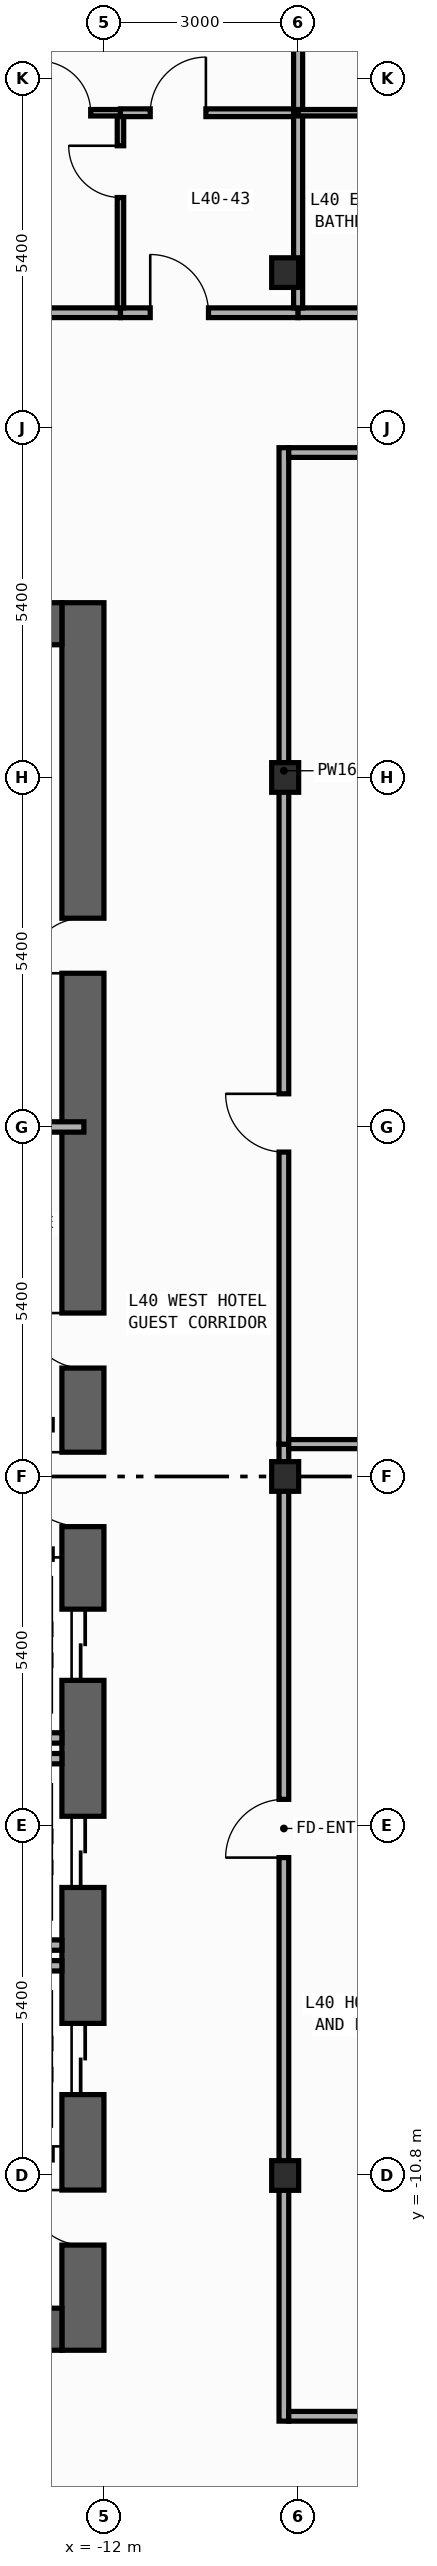
"""IFC4 building model, lengths in metres.
Left out: names, types, materials, properties, quantities, classifications, styles, units other than length and angle.
Written with IfcOpenShell. Run it as: python <this file> out.ifc"""

import sys

from ifc_helpers import new_model, si_unit, direction, frame, frame_2d, origin, origin_2d, place, context, subcontext, project, spatial, rectangle, i_section, extrude, element, fill, save


model = new_model("IFC4")
c1 = context("Model", 3, precision=1e-05, world=origin(), true_north=direction((0.0, 1.0)))
c2 = subcontext(c1, "Body", "Model", "MODEL_VIEW")
j1 = project(units=[si_unit("LENGTHUNIT", "METRE"), si_unit("PLANEANGLEUNIT", "RADIAN")], contexts=[c1])
p1 = place(None, origin())
s1 = spatial("IfcSite", under=j1, at=p1, CompositionType="ELEMENT")
p2 = place(p1, origin())
s2 = spatial("IfcBuilding", under=s1, at=p2, CompositionType="ELEMENT")
p3 = place(p2, frame((0.0, 0.0, 176.4)))
s3 = spatial("IfcBuildingStorey", under=s2, at=p3, CompositionType="ELEMENT", Elevation=176.4)
p4 = place(p3, frame((-12.325, -13.5, 0.0), z_axis=(0.0, 0.0, 1.0), x_axis=(0.0, 1.0, 0.0)))
e1 = element("IfcWall", 1, at=p4, inside=s3, PredefinedType="SHEAR", context=c2, shape_type="SweptSolid", body=[
    extrude(rectangle(XDim=27.0, YDim=0.65, at=frame_2d((13.5, 0.0))), origin(), (0.0, 0.0, 1.0), 3.54),
])
p5 = place(p4, frame((10.35, 0.0, 0.0)))
e2 = element("IfcOpeningElement", 2, at=p5, cuts=e1, PredefinedType="OPENING", context=c2, shape_type="SweptSolid", body=[
    extrude(rectangle(XDim=1.1, YDim=2.2, at=frame_2d((0.55, 1.1))), frame((0.0, 0.335, 0.0), z_axis=(0.0, -1.0, 0.0), x_axis=(1.0, 0.0, 0.0)), (0.0, 0.0, 1.0), 0.67),
])
p6 = place(p4, frame((7.15, 0.0, 0.0)))
e3 = element("IfcOpeningElement", 3, at=p6, cuts=e1, PredefinedType="OPENING", context=c2, shape_type="SweptSolid", body=[
    extrude(rectangle(XDim=1.1, YDim=2.2, at=frame_2d((0.55, 1.1))), frame((0.0, 0.335, 0.0), z_axis=(0.0, -1.0, 0.0), x_axis=(1.0, 0.0, 0.0)), (0.0, 0.0, 1.0), 0.67),
])
p7 = place(p4, frame((3.95, 0.0, 0.0)))
e4 = element("IfcOpeningElement", 4, at=p7, cuts=e1, PredefinedType="OPENING", context=c2, shape_type="SweptSolid", body=[
    extrude(rectangle(XDim=1.1, YDim=2.2, at=frame_2d((0.55, 1.1))), frame((0.0, 0.335, 0.0), z_axis=(0.0, -1.0, 0.0), x_axis=(1.0, 0.0, 0.0)), (0.0, 0.0, 1.0), 0.67),
])
p8 = place(p4, frame((15.175, 0.0, 0.0)))
e5 = element("IfcOpeningElement", 5, at=p8, cuts=e1, PredefinedType="OPENING", context=c2, shape_type="SweptSolid", body=[
    extrude(rectangle(XDim=0.85, YDim=2.1, at=frame_2d((0.425, 1.05))), frame((0.0, 0.335, 0.0), z_axis=(0.0, -1.0, 0.0), x_axis=(1.0, 0.0, 0.0)), (0.0, 0.0, 1.0), 0.67),
])
p9 = place(p4, frame((21.275, 0.0, 0.0)))
e6 = element("IfcOpeningElement", 6, at=p9, cuts=e1, PredefinedType="OPENING", context=c2, shape_type="SweptSolid", body=[
    extrude(rectangle(XDim=0.85, YDim=2.1, at=frame_2d((0.425, 1.05))), frame((0.0, 0.335, 0.0), z_axis=(0.0, -1.0, 0.0), x_axis=(1.0, 0.0, 0.0)), (0.0, 0.0, 1.0), 0.67),
])
p10 = place(p4, frame((12.725, 0.0, 0.0)))
e7 = element("IfcOpeningElement", 7, at=p10, cuts=e1, PredefinedType="OPENING", context=c2, shape_type="SweptSolid", body=[
    extrude(rectangle(XDim=1.15, YDim=2.2, at=frame_2d((0.575, 1.1))), frame((0.0, 0.335, 0.0), z_axis=(0.0, -1.0, 0.0), x_axis=(1.0, 0.0, 0.0)), (0.0, 0.0, 1.0), 0.67),
])
p11 = place(p4, frame((1.625, 0.0, 0.0)))
e8 = element("IfcOpeningElement", 8, at=p11, cuts=e1, PredefinedType="OPENING", context=c2, shape_type="SweptSolid", body=[
    extrude(rectangle(XDim=0.85, YDim=2.1, at=frame_2d((0.425, 1.05))), frame((0.0, 0.335, 0.0), z_axis=(0.0, -1.0, 0.0), x_axis=(1.0, 0.0, 0.0)), (0.0, 0.0, 1.0), 0.67),
])
for number, where, z_axis, x_axis in (
    (9, (-19.75, -13.175, 0.0), (0.0, 0.0, 1.0), (1.0, 0.0, 0.0)),
    (10, (-19.75, 13.175, 0.0), (0.0, 0.0, 1.0), (1.0, 0.0, 0.0)),
):
    element("IfcWall", number, at=place(p3, frame(where, z_axis=z_axis, x_axis=x_axis)), inside=s3, PredefinedType="SHEAR", context=c2, shape_type="SweptSolid", body=[
        extrude(rectangle(XDim=7.1, YDim=0.65, at=frame_2d((3.55, 0.0))), origin(), (0.0, 0.0, 1.0), 3.54),
    ])
for number, where, z_axis, x_axis in (
    (11, (-9.2, -10.8, 0.0), (0.0, 0.0, 1.0), (1.0, 0.0, 0.0)),
    (12, (-9.2, 0.0, 0.0), (0.0, 0.0, 1.0), (1.0, 0.0, 0.0)),
    (13, (-9.2, 10.8, 0.0), (0.0, 0.0, 1.0), (1.0, 0.0, 0.0)),
    (14, (-9.2, 18.6, 0.0), (0.0, 0.0, 1.0), (1.0, 0.0, 0.0)),
):
    element("IfcColumn", number, at=place(p3, frame(where, z_axis=z_axis, x_axis=x_axis)), inside=s3, PredefinedType="COLUMN", context=c2, shape_type="SweptSolid", body=[
        extrude(i_section(OverallWidth=0.417, OverallDepth=0.458, WebThickness=0.03, FlangeThickness=0.05, FilletRadius=0.022, at=origin_2d()), origin(), (0.0, 0.0, 1.0), 3.8),
    ])
for number, where, z_axis, x_axis in (
    (15, (-14.99, -4.04, 0.0), (0.0, 0.0, 1.0), (1.0, 0.0, 0.0)),
    (16, (-14.99, -7.24, 0.0), (0.0, 0.0, 1.0), (1.0, 0.0, 0.0)),
    (17, (-14.99, -4.36, 0.0), (0.0, 0.0, 1.0), (1.0, 0.0, 0.0)),
    (18, (-14.99, -7.56, 0.0), (0.0, 0.0, 1.0), (1.0, 0.0, 0.0)),
):
    element("IfcWall", number, at=place(p3, frame(where, z_axis=z_axis, x_axis=x_axis)), inside=s3, PredefinedType="STANDARD", context=c2, shape_type="SweptSolid", body=[
        extrude(rectangle(XDim=2.34, YDim=0.16, at=frame_2d((1.17, 0.0))), origin(), (0.0, 0.0, 1.0), 3.54),
    ])
p12 = place(p3, frame((-15.375, 5.4, 0.0), z_axis=(0.0, 0.0, 1.0), x_axis=(1.0, 0.0, 0.0)))
e19 = element("IfcWall", 19, at=p12, inside=s3, PredefinedType="PARTITIONING", context=c2, shape_type="SweptSolid", body=[
    extrude(rectangle(XDim=3.065, YDim=0.16, at=frame_2d((1.532, 0.0))), origin(), (0.0, 0.0, 1.0), 3.54),
])
p13 = place(p3, frame((-9.22, -14.595, 0.0), z_axis=(0.0, 0.0, 1.0), x_axis=(0.0, 1.0, 0.0)))
e20 = element("IfcWall", 20, at=p13, inside=s3, PredefinedType="PARTITIONING", context=c2, shape_type="SweptSolid", body=[
    extrude(rectangle(XDim=15.095, YDim=0.15, at=frame_2d((7.547, 0.0))), origin(), (0.0, 0.0, 1.0), 2.952),
])
p14 = place(p13, frame((8.707, 0.0, 0.0)))
e21 = element("IfcOpeningElement", 21, at=p14, cuts=e20, PredefinedType="OPENING", context=c2, shape_type="SweptSolid", body=[
    extrude(rectangle(XDim=0.9, YDim=2.15, at=frame_2d((0.45, 1.075))), frame((0.0, 0.085, 0.0), z_axis=(0.0, -1.0, 0.0), x_axis=(1.0, 0.0, 0.0)), (0.0, 0.0, 1.0), 0.17),
])
p15 = place(p3, frame((-9.22, 0.5, 0.0), z_axis=(0.0, 0.0, 1.0), x_axis=(0.0, 1.0, 0.0)))
e22 = element("IfcWall", 22, at=p15, inside=s3, PredefinedType="PARTITIONING", context=c2, shape_type="SweptSolid", body=[
    extrude(rectangle(XDim=15.395, YDim=0.15, at=frame_2d((7.698, 0.0))), origin(), (0.0, 0.0, 1.0), 2.952),
])
p16 = place(p15, frame((4.512, 0.0, 0.0)))
e23 = element("IfcOpeningElement", 23, at=p16, cuts=e22, PredefinedType="OPENING", context=c2, shape_type="SweptSolid", body=[
    extrude(rectangle(XDim=0.9, YDim=2.15, at=frame_2d((0.45, 1.075))), frame((0.0, 0.085, 0.0), z_axis=(0.0, -1.0, 0.0), x_axis=(1.0, 0.0, 0.0)), (0.0, 0.0, 1.0), 0.17),
])
p17 = place(p3, frame((-9.145, 15.82, 0.0), z_axis=(0.0, 0.0, 1.0), x_axis=(1.0, 0.0, 0.0)))
e24 = element("IfcWall", 24, at=p17, inside=s3, PredefinedType="PARTITIONING", context=c2, shape_type="SweptSolid", body=[
    extrude(rectangle(XDim=8.825, YDim=0.15, at=frame_2d((4.413, 0.0))), origin(), (0.0, 0.0, 1.0), 3.54),
])
p18 = place(p17, frame((1.661, 0.0, 0.0)))
e25 = element("IfcOpeningElement", 25, at=p18, cuts=e24, PredefinedType="OPENING", context=c2, shape_type="SweptSolid", body=[
    extrude(rectangle(XDim=0.9, YDim=2.15, at=frame_2d((0.45, 1.075))), frame((0.0, 0.085, 0.0), z_axis=(0.0, -1.0, 0.0), x_axis=(1.0, 0.0, 0.0)), (0.0, 0.0, 1.0), 0.17),
])
p19 = place(p3, frame((-14.4, 17.98, 0.0), z_axis=(0.0, 0.0, 1.0), x_axis=(1.0, 0.0, 0.0)))
e26 = element("IfcWall", 26, at=p19, inside=s3, PredefinedType="PARTITIONING", context=c2, shape_type="SweptSolid", body=[
    extrude(rectangle(XDim=2.655, YDim=0.15, at=frame_2d((1.327, 0.0))), origin(), (0.0, 0.0, 1.0), 3.54),
])
p20 = place(p3, frame((-11.745, 17.98, 0.0), z_axis=(0.0, 0.0, 1.0), x_axis=(1.0, 0.0, 0.0)))
e27 = element("IfcWall", 27, at=p20, inside=s3, PredefinedType="PARTITIONING", context=c2, shape_type="SweptSolid", body=[
    extrude(rectangle(XDim=2.745, YDim=0.15, at=frame_2d((1.373, 0.0))), origin(), (0.0, 0.0, 1.0), 3.54),
])
p21 = place(p20, frame((0.46, 0.0, 0.0)))
e28 = element("IfcOpeningElement", 28, at=p21, cuts=e27, PredefinedType="OPENING", context=c2, shape_type="SweptSolid", body=[
    extrude(rectangle(XDim=0.9, YDim=2.15, at=frame_2d((0.45, 1.075))), frame((0.0, 0.085, 0.0), z_axis=(0.0, -1.0, 0.0), x_axis=(1.0, 0.0, 0.0)), (0.0, 0.0, 1.0), 0.17),
])
p22 = place(p3, frame((-9.0, 17.98, 0.0), z_axis=(0.0, 0.0, 1.0), x_axis=(1.0, 0.0, 0.0)))
e29 = element("IfcWall", 29, at=p22, inside=s3, PredefinedType="PARTITIONING", context=c2, shape_type="SweptSolid", body=[
    extrude(rectangle(XDim=3.54, YDim=0.15, at=frame_2d((1.77, 0.0))), origin(), (0.0, 0.0, 1.0), 3.54),
])
p23 = place(p3, frame((-9.145, -14.52, 0.0), z_axis=(0.0, 0.0, 1.0), x_axis=(1.0, 0.0, 0.0)))
e30 = element("IfcWall", 30, at=p23, inside=s3, PredefinedType="PARTITIONING", context=c2, shape_type="SweptSolid", body=[
    extrude(rectangle(XDim=3.025, YDim=0.15, at=frame_2d((1.512, 0.0))), origin(), (0.0, 0.0, 1.0), 3.54),
])
p24 = place(p23, frame((1.665, 0.0, 0.0)))
e31 = element("IfcOpeningElement", 31, at=p24, cuts=e30, PredefinedType="OPENING", context=c2, shape_type="SweptSolid", body=[
    extrude(rectangle(XDim=0.9, YDim=2.15, at=frame_2d((0.45, 1.075))), frame((0.0, 0.085, 0.0), z_axis=(0.0, -1.0, 0.0), x_axis=(1.0, 0.0, 0.0)), (0.0, 0.0, 1.0), 0.17),
])
p25 = place(p3, frame((-9.145, 0.5, 0.0), z_axis=(0.0, 0.0, 1.0), x_axis=(1.0, 0.0, 0.0)))
e32 = element("IfcWall", 32, at=p25, inside=s3, PredefinedType="PARTITIONING", context=c2, shape_type="SweptSolid", body=[
    extrude(rectangle(XDim=3.025, YDim=0.14, at=frame_2d((1.512, 0.0))), origin(), (0.0, 0.0, 1.0), 3.54),
])
p26 = place(p3, frame((-11.745, 18.055, 0.0), z_axis=(0.0, 0.0, 1.0), x_axis=(0.0, 1.0, 0.0)))
e33 = element("IfcWall", 33, at=p26, inside=s3, PredefinedType="PARTITIONING", context=c2, shape_type="SweptSolid", body=[
    extrude(rectangle(XDim=2.965, YDim=0.1, at=frame_2d((1.482, 0.0))), origin(), (0.0, 0.0, 1.0), 3.54),
])
p27 = place(p26, frame((1.705, 0.0, 0.0)))
e34 = element("IfcOpeningElement", 34, at=p27, cuts=e33, PredefinedType="OPENING", context=c2, shape_type="SweptSolid", body=[
    extrude(rectangle(XDim=0.8, YDim=2.1, at=frame_2d((0.4, 1.05))), frame((0.0, 0.06, 0.0), z_axis=(0.0, -1.0, 0.0), x_axis=(1.0, 0.0, 0.0)), (0.0, 0.0, 1.0), 0.12),
])
p28 = place(p3, frame((-14.4, 21.07, 0.0), z_axis=(0.0, 0.0, 1.0), x_axis=(1.0, 0.0, 0.0)))
e35 = element("IfcWall", 35, at=p28, inside=s3, PredefinedType="PARTITIONING", context=c2, shape_type="SweptSolid", body=[
    extrude(rectangle(XDim=2.655, YDim=0.1, at=frame_2d((1.327, 0.0))), origin(), (0.0, 0.0, 1.0), 3.54),
])
p29 = place(p28, frame((1.395, 0.0, 0.0)))
e36 = element("IfcOpeningElement", 36, at=p29, cuts=e35, PredefinedType="OPENING", context=c2, shape_type="SweptSolid", body=[
    extrude(rectangle(XDim=0.8, YDim=2.1, at=frame_2d((0.4, 1.05))), frame((0.0, 0.06, 0.0), z_axis=(0.0, -1.0, 0.0), x_axis=(1.0, 0.0, 0.0)), (0.0, 0.0, 1.0), 0.12),
])
p30 = place(p3, frame((-11.745, 21.07, 0.0), z_axis=(0.0, 0.0, 1.0), x_axis=(1.0, 0.0, 0.0)))
e37 = element("IfcWall", 37, at=p30, inside=s3, PredefinedType="PARTITIONING", context=c2, shape_type="SweptSolid", body=[
    extrude(rectangle(XDim=2.745, YDim=0.12, at=frame_2d((1.373, 0.0))), origin(), (0.0, 0.0, 1.0), 3.54),
])
p31 = place(p30, frame((0.46, 0.0, 0.0)))
e38 = element("IfcOpeningElement", 38, at=p31, cuts=e37, PredefinedType="OPENING", context=c2, shape_type="SweptSolid", body=[
    extrude(rectangle(XDim=0.86, YDim=2.15, at=frame_2d((0.43, 1.075))), frame((0.0, 0.07, 0.0), z_axis=(0.0, -1.0, 0.0), x_axis=(1.0, 0.0, 0.0)), (0.0, 0.0, 1.0), 0.14),
])
p32 = place(p3, frame((-9.0, 18.055, 0.0), z_axis=(0.0, 0.0, 1.0), x_axis=(0.0, 1.0, 0.0)))
e39 = element("IfcWall", 39, at=p32, inside=s3, PredefinedType="PARTITIONING", context=c2, shape_type="SweptSolid", body=[
    extrude(rectangle(XDim=3.015, YDim=0.14, at=frame_2d((1.508, 0.0))), origin(), (0.0, 0.0, 1.0), 2.952),
])
p33 = place(p3, frame((-9.0, 21.07, 0.0), z_axis=(0.0, 0.0, 1.0), x_axis=(0.0, 1.0, 0.0)))
e40 = element("IfcWall", 40, at=p33, inside=s3, PredefinedType="PARTITIONING", context=c2, shape_type="SweptSolid", body=[
    extrude(rectangle(XDim=4.285, YDim=0.14, at=frame_2d((2.143, 0.0))), origin(), (0.0, 0.0, 1.0), 3.54),
])
p34 = place(p3, frame((-9.0, 21.07, 0.0), z_axis=(0.0, 0.0, 1.0), x_axis=(1.0, 0.0, 0.0)))
e41 = element("IfcWall", 41, at=p34, inside=s3, PredefinedType="PARTITIONING", context=c2, shape_type="SweptSolid", body=[
    extrude(rectangle(XDim=3.54, YDim=0.1, at=frame_2d((1.77, 0.0))), origin(), (0.0, 0.0, 1.0), 3.54),
])
p35 = place(p34, frame((1.471, 0.0, 0.0)))
e42 = element("IfcOpeningElement", 42, at=p35, cuts=e41, PredefinedType="OPENING", context=c2, shape_type="SweptSolid", body=[
    extrude(rectangle(XDim=0.8, YDim=2.1, at=frame_2d((0.4, 1.05))), frame((0.0, 0.06, 0.0), z_axis=(0.0, -1.0, 0.0), x_axis=(1.0, 0.0, 0.0)), (0.0, 0.0, 1.0), 0.12),
])
p36 = place(p5, origin())
e43 = element("IfcDoor", 43, at=p36, inside=s3, OperationType="DOUBLE_DOOR_SLIDING", PredefinedType="DOOR", context=c2, shape_type="SweptSolid", body=[
    extrude(rectangle(XDim=1.1, YDim=2.2, at=frame_2d((0.55, 1.1))), frame((0.0, 0.025, 0.0), z_axis=(0.0, -1.0, 0.0), x_axis=(1.0, 0.0, 0.0)), (0.0, 0.0, 1.0), 0.05),
])
fill(e2, e43)
p37 = place(p6, origin())
e44 = element("IfcDoor", 44, at=p37, inside=s3, OperationType="DOUBLE_DOOR_SLIDING", PredefinedType="DOOR", context=c2, shape_type="SweptSolid", body=[
    extrude(rectangle(XDim=1.1, YDim=2.2, at=frame_2d((0.55, 1.1))), frame((0.0, 0.025, 0.0), z_axis=(0.0, -1.0, 0.0), x_axis=(1.0, 0.0, 0.0)), (0.0, 0.0, 1.0), 0.05),
])
fill(e3, e44)
p38 = place(p7, origin())
e45 = element("IfcDoor", 45, at=p38, inside=s3, OperationType="DOUBLE_DOOR_SLIDING", PredefinedType="DOOR", context=c2, shape_type="SweptSolid", body=[
    extrude(rectangle(XDim=1.1, YDim=2.2, at=frame_2d((0.55, 1.1))), frame((0.0, 0.025, 0.0), z_axis=(0.0, -1.0, 0.0), x_axis=(1.0, 0.0, 0.0)), (0.0, 0.0, 1.0), 0.05),
])
fill(e4, e45)
p39 = place(p8, origin())
e46 = element("IfcDoor", 46, at=p39, inside=s3, OperationType="SINGLE_SWING_RIGHT", PredefinedType="DOOR", context=c2, shape_type="SweptSolid", body=[
    extrude(rectangle(XDim=0.85, YDim=2.1, at=frame_2d((0.425, 1.05))), frame((0.0, 0.025, 0.0), z_axis=(0.0, -1.0, 0.0), x_axis=(1.0, 0.0, 0.0)), (0.0, 0.0, 1.0), 0.05),
])
fill(e5, e46)
p40 = place(p9, origin())
e47 = element("IfcDoor", 47, at=p40, inside=s3, OperationType="SINGLE_SWING_LEFT", PredefinedType="DOOR", context=c2, shape_type="SweptSolid", body=[
    extrude(rectangle(XDim=0.85, YDim=2.1, at=frame_2d((0.425, 1.05))), frame((0.0, 0.025, 0.0), z_axis=(0.0, -1.0, 0.0), x_axis=(1.0, 0.0, 0.0)), (0.0, 0.0, 1.0), 0.05),
])
fill(e6, e47)
p41 = place(p10, origin())
e48 = element("IfcDoor", 48, at=p41, inside=s3, OperationType="SINGLE_SWING_RIGHT", PredefinedType="DOOR", context=c2, shape_type="SweptSolid", body=[
    extrude(rectangle(XDim=1.15, YDim=2.2, at=frame_2d((0.575, 1.1))), frame((0.0, 0.025, 0.0), z_axis=(0.0, -1.0, 0.0), x_axis=(1.0, 0.0, 0.0)), (0.0, 0.0, 1.0), 0.05),
])
fill(e7, e48)
p42 = place(p11, origin())
e49 = element("IfcDoor", 49, at=p42, inside=s3, OperationType="SINGLE_SWING_RIGHT", PredefinedType="DOOR", context=c2, shape_type="SweptSolid", body=[
    extrude(rectangle(XDim=0.85, YDim=2.1, at=frame_2d((0.425, 1.05))), frame((0.0, 0.025, 0.0), z_axis=(0.0, -1.0, 0.0), x_axis=(1.0, 0.0, 0.0)), (0.0, 0.0, 1.0), 0.05),
])
fill(e8, e49)
p43 = place(p14, origin())
e50 = element("IfcDoor", 50, at=p43, inside=s3, OperationType="SINGLE_SWING_LEFT", PredefinedType="DOOR", context=c2, shape_type="SweptSolid", body=[
    extrude(rectangle(XDim=0.9, YDim=2.15, at=frame_2d((0.45, 1.075))), frame((0.0, 0.025, 0.0), z_axis=(0.0, -1.0, 0.0), x_axis=(1.0, 0.0, 0.0)), (0.0, 0.0, 1.0), 0.05),
])
fill(e21, e50)
p44 = place(p16, origin())
e51 = element("IfcDoor", 51, at=p44, inside=s3, OperationType="SINGLE_SWING_RIGHT", PredefinedType="DOOR", context=c2, shape_type="SweptSolid", body=[
    extrude(rectangle(XDim=0.9, YDim=2.15, at=frame_2d((0.45, 1.075))), frame((0.0, 0.025, 0.0), z_axis=(0.0, -1.0, 0.0), x_axis=(1.0, 0.0, 0.0)), (0.0, 0.0, 1.0), 0.05),
])
fill(e23, e51)
p45 = place(p21, origin())
e52 = element("IfcDoor", 52, at=p45, inside=s3, OperationType="SINGLE_SWING_LEFT", PredefinedType="DOOR", context=c2, shape_type="SweptSolid", body=[
    extrude(rectangle(XDim=0.9, YDim=2.15, at=frame_2d((0.45, 1.075))), frame((0.0, 0.025, 0.0), z_axis=(0.0, -1.0, 0.0), x_axis=(1.0, 0.0, 0.0)), (0.0, 0.0, 1.0), 0.05),
])
fill(e28, e52)
p46 = place(p27, origin())
e53 = element("IfcDoor", 53, at=p46, inside=s3, OperationType="SINGLE_SWING_RIGHT", PredefinedType="DOOR", context=c2, shape_type="SweptSolid", body=[
    extrude(rectangle(XDim=0.8, YDim=2.1, at=frame_2d((0.4, 1.05))), frame((0.0, 0.025, 0.0), z_axis=(0.0, -1.0, 0.0), x_axis=(1.0, 0.0, 0.0)), (0.0, 0.0, 1.0), 0.05),
])
fill(e34, e53)
p47 = place(p29, origin())
e54 = element("IfcDoor", 54, at=p47, inside=s3, OperationType="SINGLE_SWING_LEFT", PredefinedType="DOOR", context=c2, shape_type="SweptSolid", body=[
    extrude(rectangle(XDim=0.8, YDim=2.1, at=frame_2d((0.4, 1.05))), frame((0.0, 0.025, 0.0), z_axis=(0.0, -1.0, 0.0), x_axis=(1.0, 0.0, 0.0)), (0.0, 0.0, 1.0), 0.05),
])
fill(e36, e54)
p48 = place(p31, origin())
e55 = element("IfcDoor", 55, at=p48, inside=s3, OperationType="SINGLE_SWING_RIGHT", PredefinedType="DOOR", context=c2, shape_type="SweptSolid", body=[
    extrude(rectangle(XDim=0.86, YDim=2.15, at=frame_2d((0.43, 1.075))), frame((0.0, 0.025, 0.0), z_axis=(0.0, -1.0, 0.0), x_axis=(1.0, 0.0, 0.0)), (0.0, 0.0, 1.0), 0.05),
])
fill(e38, e55)
save(model, sys.argv[1])
